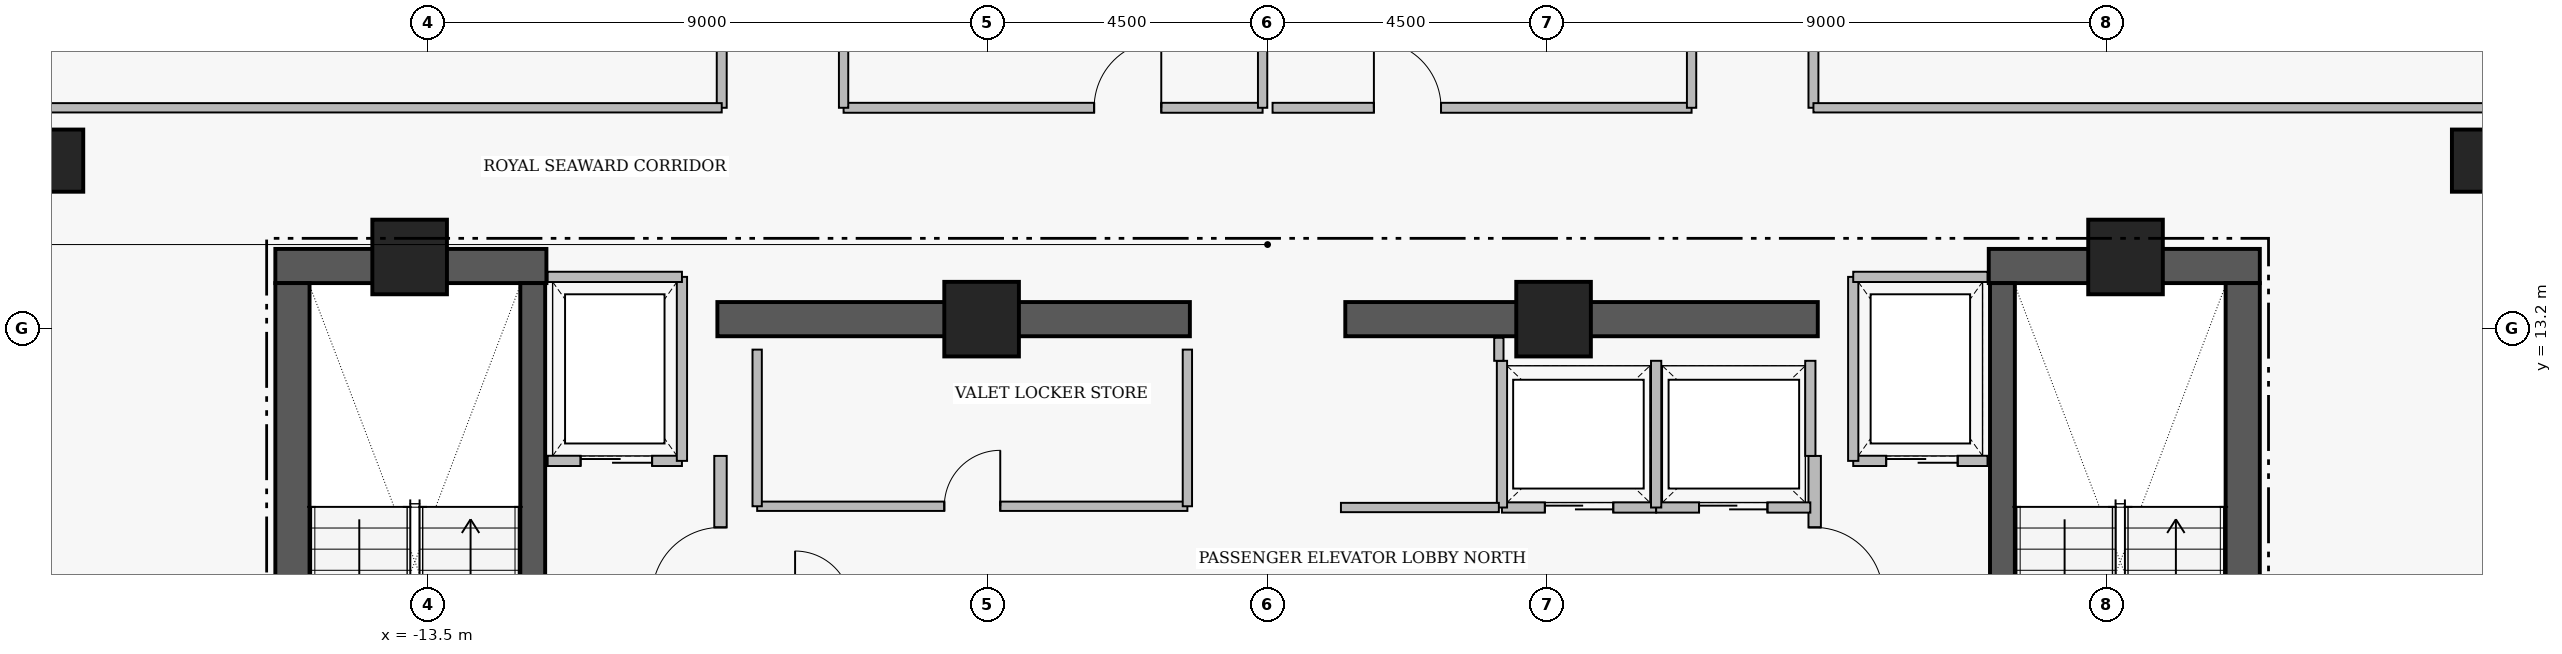
"""IFC4 building model, lengths in metres.
Left out: names, types, materials, properties, quantities, classifications, styles, units other than length and angle.
Written with IfcOpenShell. Run it as: python <this file> out.ifc"""

import sys

from ifc_helpers import new_model, si_unit, direction, frame, frame_2d, origin, origin_2d, place, context, subcontext, project, spatial, rectangle, extrude, element, fill, save


model = new_model("IFC4")
c1 = context("Model", 3, precision=1e-05, world=origin(), true_north=direction((0.0, 1.0)))
c2 = subcontext(c1, "Body", "Model", "MODEL_VIEW")
j1 = project(units=[si_unit("LENGTHUNIT", "METRE"), si_unit("PLANEANGLEUNIT", "RADIAN")], contexts=[c1])
p1 = place(None, origin())
s1 = spatial("IfcSite", under=j1, at=p1, CompositionType="ELEMENT")
p2 = place(p1, origin())
s2 = spatial("IfcBuilding", under=s1, at=p2, CompositionType="ELEMENT")
p3 = place(p2, frame((0.0, 0.0, 288.45)))
s3 = spatial("IfcBuildingStorey", under=s2, at=p3, CompositionType="ELEMENT", Elevation=288.45)
for number, where, z_axis, x_axis in (
    (1, (-15.96, 14.205, 0.0), (0.0, 0.0, 1.0), (1.0, 0.0, 0.0)),
    (2, (11.6, 14.205, 0.0), (0.0, 0.0, 1.0), (1.0, 0.0, 0.0)),
):
    element("IfcWall", number, at=place(p3, frame(where, z_axis=z_axis, x_axis=x_axis)), inside=s3, PredefinedType="SHEAR", context=c2, shape_type="SweptSolid", body=[
        extrude(rectangle(XDim=4.36, YDim=0.55, at=frame_2d((2.18, 0.0))), origin(), (0.0, 0.0, 1.0), 4.21),
    ])
for number, where, z_axis, x_axis in (
    (3, (-15.685, 4.97, 0.0), (0.0, 0.0, 1.0), (0.0, 1.0, 0.0)),
    (4, (15.685, 4.97, 0.0), (0.0, 0.0, 1.0), (0.0, 1.0, 0.0)),
):
    element("IfcWall", number, at=place(p3, frame(where, z_axis=z_axis, x_axis=x_axis)), inside=s3, PredefinedType="SHEAR", context=c2, shape_type="SweptSolid", body=[
        extrude(rectangle(XDim=8.96, YDim=0.55, at=frame_2d((4.48, 0.0))), origin(), (0.0, 0.0, 1.0), 4.21),
    ])
for number, where, z_axis, x_axis in (
    (5, (-8.85, 13.35, 0.0), (0.0, 0.0, 1.0), (1.0, 0.0, 0.0)),
    (6, (1.25, 13.35, 0.0), (0.0, 0.0, 1.0), (1.0, 0.0, 0.0)),
):
    element("IfcWall", number, at=place(p3, frame(where, z_axis=z_axis, x_axis=x_axis)), inside=s3, PredefinedType="SHEAR", context=c2, shape_type="SweptSolid", body=[
        extrude(rectangle(XDim=7.6, YDim=0.55, at=frame_2d((3.8, 0.0))), origin(), (0.0, 0.0, 1.0), 4.18),
    ])
p4 = place(p3, frame((-11.82, 4.97, 0.0), z_axis=(0.0, 0.0, 1.0), x_axis=(0.0, 1.0, 0.0)))
e7 = element("IfcWall", 7, at=p4, inside=s3, PredefinedType="SHEAR", context=c2, shape_type="SweptSolid", body=[
    extrude(rectangle(XDim=8.96, YDim=0.4, at=frame_2d((4.48, 0.0))), origin(), (0.0, 0.0, 1.0), 4.21),
])
p5 = place(p4, frame((0.31, 0.0, 0.0)))
e8 = element("IfcOpeningElement", 8, at=p5, cuts=e7, PredefinedType="OPENING", context=c2, shape_type="SweptSolid", body=[
    extrude(rectangle(XDim=1.12, YDim=2.22, at=frame_2d((0.56, 1.11))), frame((0.0, 0.21, 0.0), z_axis=(0.0, -1.0, 0.0), x_axis=(1.0, 0.0, 0.0)), (0.0, 0.0, 1.0), 0.42),
])
p6 = place(p3, frame((11.82, 13.93, 0.0), z_axis=(0.0, 0.0, 1.0), x_axis=(0.0, -1.0, 0.0)))
e9 = element("IfcWall", 9, at=p6, inside=s3, PredefinedType="SHEAR", context=c2, shape_type="SweptSolid", body=[
    extrude(rectangle(XDim=8.96, YDim=0.4, at=frame_2d((4.48, 0.0))), origin(), (0.0, 0.0, 1.0), 4.21),
])
p7 = place(p6, frame((7.53, 0.0, 0.0)))
e10 = element("IfcOpeningElement", 10, at=p7, cuts=e9, PredefinedType="OPENING", context=c2, shape_type="SweptSolid", body=[
    extrude(rectangle(XDim=1.12, YDim=2.22, at=frame_2d((0.56, 1.11))), frame((0.0, 0.21, 0.0), z_axis=(0.0, -1.0, 0.0), x_axis=(1.0, 0.0, 0.0)), (0.0, 0.0, 1.0), 0.42),
])
for number, where, z_axis, x_axis in (
    (11, (-13.8, 14.35, 0.0), (0.0, 0.0, 1.0), (1.0, 0.0, 0.0)),
    (12, (-4.6, 13.35, 0.0), (0.0, 0.0, 1.0), (1.0, 0.0, 0.0)),
    (13, (4.6, 13.35, 0.0), (0.0, 0.0, 1.0), (1.0, 0.0, 0.0)),
    (14, (13.8, 14.35, 0.0), (0.0, 0.0, 1.0), (1.0, 0.0, 0.0)),
):
    element("IfcColumn", number, at=place(p3, frame(where, z_axis=z_axis, x_axis=x_axis)), inside=s3, PredefinedType="COLUMN", context=c2, shape_type="SweptSolid", body=[
        extrude(rectangle(XDim=1.2, YDim=1.2, at=origin_2d()), origin(), (0.0, 0.0, 1.0), 4.4),
    ])
for number, where, z_axis, x_axis in (
    (15, (-19.55, 15.9, 0.0), (0.0, 0.0, 1.0), (1.0, 0.0, 0.0)),
    (16, (19.55, 15.9, 0.0), (0.0, 0.0, 1.0), (1.0, 0.0, 0.0)),
):
    element("IfcColumn", number, at=place(p3, frame(where, z_axis=z_axis, x_axis=x_axis)), inside=s3, PredefinedType="COLUMN", context=c2, shape_type="SweptSolid", body=[
        extrude(rectangle(XDim=1.0, YDim=1.0, at=origin_2d()), origin(), (0.0, 0.0, 1.0), 4.4),
    ])
p8 = place(p3, frame((-8.8, 5.05, 0.0), z_axis=(0.0, 0.0, 1.0), x_axis=(0.0, 1.0, 0.0)))
e17 = element("IfcWall", 17, at=p8, inside=s3, PredefinedType="PARTITIONING", context=c2, shape_type="SweptSolid", body=[
    extrude(rectangle(XDim=6.1, YDim=0.2, at=frame_2d((3.05, 0.0))), origin(), (0.0, 0.0, 1.0), 4.18),
])
p9 = place(p8, frame((0.25, 0.0, 0.0)))
e18 = element("IfcOpeningElement", 18, at=p9, cuts=e17, PredefinedType="OPENING", context=c2, shape_type="SweptSolid", body=[
    extrude(rectangle(XDim=1.1, YDim=2.2, at=frame_2d((0.55, 1.1))), frame((0.0, 0.11, 0.0), z_axis=(0.0, -1.0, 0.0), x_axis=(1.0, 0.0, 0.0)), (0.0, 0.0, 1.0), 0.22),
])
p10 = place(p8, frame((3.85, 0.0, 0.0)))
e19 = element("IfcOpeningElement", 19, at=p10, cuts=e17, PredefinedType="OPENING", context=c2, shape_type="SweptSolid", body=[
    extrude(rectangle(XDim=1.1, YDim=2.2, at=frame_2d((0.55, 1.1))), frame((0.0, 0.11, 0.0), z_axis=(0.0, -1.0, 0.0), x_axis=(1.0, 0.0, 0.0)), (0.0, 0.0, 1.0), 0.22),
])
p11 = place(p3, frame((8.8, 11.15, 0.0), z_axis=(0.0, 0.0, 1.0), x_axis=(0.0, -1.0, 0.0)))
e20 = element("IfcWall", 20, at=p11, inside=s3, PredefinedType="PARTITIONING", context=c2, shape_type="SweptSolid", body=[
    extrude(rectangle(XDim=6.1, YDim=0.2, at=frame_2d((3.05, 0.0))), origin(), (0.0, 0.0, 1.0), 4.18),
])
p12 = place(p11, frame((1.15, 0.0, 0.0)))
e21 = element("IfcOpeningElement", 21, at=p12, cuts=e20, PredefinedType="OPENING", context=c2, shape_type="SweptSolid", body=[
    extrude(rectangle(XDim=1.1, YDim=2.2, at=frame_2d((0.55, 1.1))), frame((0.0, 0.11, 0.0), z_axis=(0.0, -1.0, 0.0), x_axis=(1.0, 0.0, 0.0)), (0.0, 0.0, 1.0), 0.22),
])
p13 = place(p11, frame((4.75, 0.0, 0.0)))
e22 = element("IfcOpeningElement", 22, at=p13, cuts=e20, PredefinedType="OPENING", context=c2, shape_type="SweptSolid", body=[
    extrude(rectangle(XDim=1.1, YDim=2.2, at=frame_2d((0.55, 1.1))), frame((0.0, 0.11, 0.0), z_axis=(0.0, -1.0, 0.0), x_axis=(1.0, 0.0, 0.0)), (0.0, 0.0, 1.0), 0.22),
])
p14 = place(p3, frame((-11.58, 11.07, 0.0), z_axis=(0.0, 0.0, 1.0), x_axis=(1.0, 0.0, 0.0)))
e23 = element("IfcWall", 23, at=p14, inside=s3, PredefinedType="PARTITIONING", context=c2, shape_type="SweptSolid", body=[
    extrude(rectangle(XDim=2.16, YDim=0.165, at=frame_2d((1.08, 0.0))), origin(), (0.0, 0.0, 1.0), 4.18),
])
p15 = place(p14, frame((0.53, 0.0, 0.0)))
e24 = element("IfcOpeningElement", 24, at=p15, cuts=e23, PredefinedType="OPENING", context=c2, shape_type="SweptSolid", body=[
    extrude(rectangle(XDim=1.15, YDim=2.25, at=frame_2d((0.575, 1.125))), frame((0.0, 0.093, 0.0), z_axis=(0.0, -1.0, 0.0), x_axis=(1.0, 0.0, 0.0)), (0.0, 0.0, 1.0), 0.185),
])
p16 = place(p3, frame((9.42, 11.07, 0.0), z_axis=(0.0, 0.0, 1.0), x_axis=(1.0, 0.0, 0.0)))
e25 = element("IfcWall", 25, at=p16, inside=s3, PredefinedType="PARTITIONING", context=c2, shape_type="SweptSolid", body=[
    extrude(rectangle(XDim=2.16, YDim=0.165, at=frame_2d((1.08, 0.0))), origin(), (0.0, 0.0, 1.0), 4.18),
])
p17 = place(p16, frame((0.53, 0.0, 0.0)))
e26 = element("IfcOpeningElement", 26, at=p17, cuts=e25, PredefinedType="OPENING", context=c2, shape_type="SweptSolid", body=[
    extrude(rectangle(XDim=1.15, YDim=2.25, at=frame_2d((0.575, 1.125))), frame((0.0, 0.093, 0.0), z_axis=(0.0, -1.0, 0.0), x_axis=(1.0, 0.0, 0.0)), (0.0, 0.0, 1.0), 0.185),
])
p18 = place(p3, frame((3.77, 10.32, 0.0), z_axis=(0.0, 0.0, 1.0), x_axis=(1.0, 0.0, 0.0)))
e27 = element("IfcWall", 27, at=p18, inside=s3, PredefinedType="PARTITIONING", context=c2, shape_type="SweptSolid", body=[
    extrude(rectangle(XDim=2.48, YDim=0.165, at=frame_2d((1.24, 0.0))), origin(), (0.0, 0.0, 1.0), 4.18),
])
p19 = place(p18, frame((0.69, 0.0, 0.0)))
e28 = element("IfcOpeningElement", 28, at=p19, cuts=e27, PredefinedType="OPENING", context=c2, shape_type="SweptSolid", body=[
    extrude(rectangle(XDim=1.1, YDim=2.25, at=frame_2d((0.55, 1.125))), frame((0.0, 0.093, 0.0), z_axis=(0.0, -1.0, 0.0), x_axis=(1.0, 0.0, 0.0)), (0.0, 0.0, 1.0), 0.185),
])
p20 = place(p3, frame((6.25, 10.32, 0.0), z_axis=(0.0, 0.0, 1.0), x_axis=(1.0, 0.0, 0.0)))
e29 = element("IfcWall", 29, at=p20, inside=s3, PredefinedType="PARTITIONING", context=c2, shape_type="SweptSolid", body=[
    extrude(rectangle(XDim=2.48, YDim=0.165, at=frame_2d((1.24, 0.0))), origin(), (0.0, 0.0, 1.0), 4.18),
])
p21 = place(p20, frame((0.69, 0.0, 0.0)))
e30 = element("IfcOpeningElement", 30, at=p21, cuts=e29, PredefinedType="OPENING", context=c2, shape_type="SweptSolid", body=[
    extrude(rectangle(XDim=1.1, YDim=2.25, at=frame_2d((0.55, 1.125))), frame((0.0, 0.093, 0.0), z_axis=(0.0, -1.0, 0.0), x_axis=(1.0, 0.0, 0.0)), (0.0, 0.0, 1.0), 0.185),
])
p22 = place(p3, frame((-8.21, 10.34, 0.0), z_axis=(0.0, 0.0, 1.0), x_axis=(1.0, 0.0, 0.0)))
e31 = element("IfcWall", 31, at=p22, inside=s3, PredefinedType="PARTITIONING", context=c2, shape_type="SweptSolid", body=[
    extrude(rectangle(XDim=6.92, YDim=0.15, at=frame_2d((3.46, 0.0))), origin(), (0.0, 0.0, 1.0), 4.18),
])
p23 = place(p22, frame((3.01, 0.0, 0.0)))
e32 = element("IfcOpeningElement", 32, at=p23, cuts=e31, PredefinedType="OPENING", context=c2, shape_type="SweptSolid", body=[
    extrude(rectangle(XDim=0.9, YDim=2.15, at=frame_2d((0.45, 1.075))), frame((0.0, 0.085, 0.0), z_axis=(0.0, -1.0, 0.0), x_axis=(1.0, 0.0, 0.0)), (0.0, 0.0, 1.0), 0.17),
])
p24 = place(p3, frame((-6.82, 16.75, 0.0), z_axis=(0.0, 0.0, 1.0), x_axis=(1.0, 0.0, 0.0)))
e33 = element("IfcWall", 33, at=p24, inside=s3, PredefinedType="PARTITIONING", context=c2, shape_type="SweptSolid", body=[
    extrude(rectangle(XDim=6.74, YDim=0.16, at=frame_2d((3.37, 0.0))), origin(), (0.0, 0.0, 1.0), 3.776),
])
p25 = place(p24, frame((4.03, 0.0, 0.0)))
e34 = element("IfcOpeningElement", 34, at=p25, cuts=e33, PredefinedType="OPENING", context=c2, shape_type="SweptSolid", body=[
    extrude(rectangle(XDim=1.08, YDim=2.18, at=frame_2d((0.54, 1.09))), frame((0.0, 0.09, 0.0), z_axis=(0.0, -1.0, 0.0), x_axis=(1.0, 0.0, 0.0)), (0.0, 0.0, 1.0), 0.18),
])
p26 = place(p3, frame((0.08, 16.75, 0.0), z_axis=(0.0, 0.0, 1.0), x_axis=(1.0, 0.0, 0.0)))
e35 = element("IfcWall", 35, at=p26, inside=s3, PredefinedType="PARTITIONING", context=c2, shape_type="SweptSolid", body=[
    extrude(rectangle(XDim=6.74, YDim=0.16, at=frame_2d((3.37, 0.0))), origin(), (0.0, 0.0, 1.0), 3.776),
])
p27 = place(p26, frame((1.63, 0.0, 0.0)))
e36 = element("IfcOpeningElement", 36, at=p27, cuts=e35, PredefinedType="OPENING", context=c2, shape_type="SweptSolid", body=[
    extrude(rectangle(XDim=1.08, YDim=2.18, at=frame_2d((0.54, 1.09))), frame((0.0, 0.09, 0.0), z_axis=(0.0, -1.0, 0.0), x_axis=(1.0, 0.0, 0.0)), (0.0, 0.0, 1.0), 0.18),
])
p28 = place(p3, frame((-8.78, 16.75, 0.0), z_axis=(0.0, 0.0, 1.0), x_axis=(0.0, 1.0, 0.0)))
e37 = element("IfcWall", 37, at=p28, inside=s3, PredefinedType="PARTITIONING", context=c2, shape_type="SweptSolid", body=[
    extrude(rectangle(XDim=14.2, YDim=0.16, at=frame_2d((7.1, 0.0))), origin(), (0.0, 0.0, 1.0), 4.18),
])
p29 = place(p28, frame((6.56, 0.0, 0.0)))
e38 = element("IfcOpeningElement", 38, at=p29, cuts=e37, PredefinedType="OPENING", context=c2, shape_type="SweptSolid", body=[
    extrude(rectangle(XDim=1.08, YDim=2.18, at=frame_2d((0.54, 1.09))), frame((0.0, 0.09, 0.0), z_axis=(0.0, -1.0, 0.0), x_axis=(1.0, 0.0, 0.0)), (0.0, 0.0, 1.0), 0.18),
])
p30 = place(p3, frame((8.78, 16.75, 0.0), z_axis=(0.0, 0.0, 1.0), x_axis=(0.0, 1.0, 0.0)))
e39 = element("IfcWall", 39, at=p30, inside=s3, PredefinedType="PARTITIONING", context=c2, shape_type="SweptSolid", body=[
    extrude(rectangle(XDim=14.2, YDim=0.16, at=frame_2d((7.1, 0.0))), origin(), (0.0, 0.0, 1.0), 4.18),
])
p31 = place(p30, frame((6.56, 0.0, 0.0)))
e40 = element("IfcOpeningElement", 40, at=p31, cuts=e39, PredefinedType="OPENING", context=c2, shape_type="SweptSolid", body=[
    extrude(rectangle(XDim=1.08, YDim=2.18, at=frame_2d((0.54, 1.09))), frame((0.0, 0.09, 0.0), z_axis=(0.0, -1.0, 0.0), x_axis=(1.0, 0.0, 0.0)), (0.0, 0.0, 1.0), 0.18),
])
p32 = place(p3, frame((-9.42, 11.07, 0.0), z_axis=(0.0, 0.0, 1.0), x_axis=(0.0, 1.0, 0.0)))
e41 = element("IfcWall", 41, at=p32, inside=s3, PredefinedType="PARTITIONING", context=c2, shape_type="SweptSolid", body=[
    extrude(rectangle(XDim=2.96, YDim=0.165, at=frame_2d((1.48, 0.0))), origin(), (0.0, 0.0, 1.0), 4.18),
])
p33 = place(p3, frame((-11.58, 14.03, 0.0), z_axis=(0.0, 0.0, 1.0), x_axis=(1.0, 0.0, 0.0)))
e42 = element("IfcWall", 42, at=p33, inside=s3, PredefinedType="PARTITIONING", context=c2, shape_type="SweptSolid", body=[
    extrude(rectangle(XDim=2.16, YDim=0.165, at=frame_2d((1.08, 0.0))), origin(), (0.0, 0.0, 1.0), 4.18),
])
p34 = place(p3, frame((9.42, 11.07, 0.0), z_axis=(0.0, 0.0, 1.0), x_axis=(0.0, 1.0, 0.0)))
e43 = element("IfcWall", 43, at=p34, inside=s3, PredefinedType="PARTITIONING", context=c2, shape_type="SweptSolid", body=[
    extrude(rectangle(XDim=2.96, YDim=0.165, at=frame_2d((1.48, 0.0))), origin(), (0.0, 0.0, 1.0), 4.18),
])
p35 = place(p3, frame((9.42, 14.03, 0.0), z_axis=(0.0, 0.0, 1.0), x_axis=(1.0, 0.0, 0.0)))
e44 = element("IfcWall", 44, at=p35, inside=s3, PredefinedType="PARTITIONING", context=c2, shape_type="SweptSolid", body=[
    extrude(rectangle(XDim=2.16, YDim=0.165, at=frame_2d((1.08, 0.0))), origin(), (0.0, 0.0, 1.0), 4.18),
])
for number, where, z_axis, x_axis in (
    (45, (3.77, 10.32, 0.0), (0.0, 0.0, 1.0), (0.0, 1.0, 0.0)),
    (46, (6.25, 10.32, 0.0), (0.0, 0.0, 1.0), (0.0, 1.0, 0.0)),
):
    element("IfcWall", number, at=place(p3, frame(where, z_axis=z_axis, x_axis=x_axis)), inside=s3, PredefinedType="PARTITIONING", context=c2, shape_type="SweptSolid", body=[
        extrude(rectangle(XDim=2.36, YDim=0.165, at=frame_2d((1.18, 0.0))), origin(), (0.0, 0.0, 1.0), 4.18),
    ])
p36 = place(p3, frame((8.73, 11.15, 0.0), z_axis=(0.0, 0.0, 1.0), x_axis=(0.0, 1.0, 0.0)))
e47 = element("IfcWall", 47, at=p36, inside=s3, PredefinedType="PARTITIONING", context=c2, shape_type="SweptSolid", body=[
    extrude(rectangle(XDim=1.53, YDim=0.165, at=frame_2d((0.765, 0.0))), origin(), (0.0, 0.0, 1.0), 4.18),
])
for number, where, z_axis, x_axis in (
    (48, (-8.21, 10.34, 0.0), (0.0, 0.0, 1.0), (0.0, 1.0, 0.0)),
    (49, (-1.29, 10.34, 0.0), (0.0, 0.0, 1.0), (0.0, 1.0, 0.0)),
):
    element("IfcWall", number, at=place(p3, frame(where, z_axis=z_axis, x_axis=x_axis)), inside=s3, PredefinedType="PARTITIONING", context=c2, shape_type="SweptSolid", body=[
        extrude(rectangle(XDim=2.52, YDim=0.15, at=frame_2d((1.26, 0.0))), origin(), (0.0, 0.0, 1.0), 4.18),
    ])
p37 = place(p3, frame((1.18, 10.32, 0.0), z_axis=(0.0, 0.0, 1.0), x_axis=(1.0, 0.0, 0.0)))
e50 = element("IfcWall", 50, at=p37, inside=s3, PredefinedType="PARTITIONING", context=c2, shape_type="SweptSolid", body=[
    extrude(rectangle(XDim=2.54, YDim=0.15, at=frame_2d((1.27, 0.0))), origin(), (0.0, 0.0, 1.0), 4.18),
])
p38 = place(p3, frame((3.72, 12.68, 0.0), z_axis=(0.0, 0.0, 1.0), x_axis=(0.0, 1.0, 0.0)))
e51 = element("IfcWall", 51, at=p38, inside=s3, PredefinedType="PARTITIONING", context=c2, shape_type="SweptSolid", body=[
    extrude(rectangle(XDim=0.37, YDim=0.15, at=frame_2d((0.185, 0.0))), origin(), (0.0, 0.0, 1.0), 4.18),
])
for number, where, z_axis, x_axis in (
    (52, (-6.82, 16.75, 0.0), (0.0, 0.0, 1.0), (0.0, 1.0, 0.0)),
    (53, (-0.08, 16.75, 0.0), (0.0, 0.0, 1.0), (0.0, 1.0, 0.0)),
    (54, (6.82, 16.75, 0.0), (0.0, 0.0, 1.0), (0.0, 1.0, 0.0)),
):
    element("IfcWall", number, at=place(p3, frame(where, z_axis=z_axis, x_axis=x_axis)), inside=s3, PredefinedType="PARTITIONING", context=c2, shape_type="SweptSolid", body=[
        extrude(rectangle(XDim=7.45, YDim=0.15, at=frame_2d((3.725, 0.0))), origin(), (0.0, 0.0, 1.0), 4.18),
    ])
for number, where, z_axis, x_axis in (
    (55, (-21.146, 16.75, 0.0), (0.0, 0.0, 1.0), (1.0, 0.0, 0.0)),
    (56, (8.78, 16.75, 0.0), (0.0, 0.0, 1.0), (1.0, 0.0, 0.0)),
):
    element("IfcWall", number, at=place(p3, frame(where, z_axis=z_axis, x_axis=x_axis)), inside=s3, PredefinedType="PARTITIONING", context=c2, shape_type="SweptSolid", body=[
        extrude(rectangle(XDim=12.365, YDim=0.15, at=frame_2d((6.183, 0.0))), origin(), (0.0, 0.0, 1.0), 3.776),
    ])
p39 = place(p10, origin())
e57 = element("IfcDoor", 57, at=p39, inside=s3, OperationType="SINGLE_SWING_LEFT", PredefinedType="DOOR", context=c2, shape_type="SweptSolid", body=[
    extrude(rectangle(XDim=1.1, YDim=2.2, at=frame_2d((0.55, 1.1))), frame((0.0, 0.025, 0.0), z_axis=(0.0, -1.0, 0.0), x_axis=(1.0, 0.0, 0.0)), (0.0, 0.0, 1.0), 0.05),
])
fill(e19, e57)
p40 = place(p12, origin())
e58 = element("IfcDoor", 58, at=p40, inside=s3, OperationType="SINGLE_SWING_RIGHT", PredefinedType="DOOR", context=c2, shape_type="SweptSolid", body=[
    extrude(rectangle(XDim=1.1, YDim=2.2, at=frame_2d((0.55, 1.1))), frame((0.0, 0.025, 0.0), z_axis=(0.0, -1.0, 0.0), x_axis=(1.0, 0.0, 0.0)), (0.0, 0.0, 1.0), 0.05),
])
fill(e21, e58)
p41 = place(p15, origin())
e59 = element("IfcDoor", 59, at=p41, inside=s3, OperationType="SLIDING_TO_LEFT", PredefinedType="DOOR", context=c2, shape_type="SweptSolid", body=[
    extrude(rectangle(XDim=1.15, YDim=2.25, at=frame_2d((0.575, 1.125))), frame((0.0, 0.025, 0.0), z_axis=(0.0, -1.0, 0.0), x_axis=(1.0, 0.0, 0.0)), (0.0, 0.0, 1.0), 0.05),
])
fill(e24, e59)
p42 = place(p17, origin())
e60 = element("IfcDoor", 60, at=p42, inside=s3, OperationType="SLIDING_TO_LEFT", PredefinedType="DOOR", context=c2, shape_type="SweptSolid", body=[
    extrude(rectangle(XDim=1.15, YDim=2.25, at=frame_2d((0.575, 1.125))), frame((0.0, 0.025, 0.0), z_axis=(0.0, -1.0, 0.0), x_axis=(1.0, 0.0, 0.0)), (0.0, 0.0, 1.0), 0.05),
])
fill(e26, e60)
p43 = place(p19, origin())
e61 = element("IfcDoor", 61, at=p43, inside=s3, OperationType="SLIDING_TO_LEFT", PredefinedType="DOOR", context=c2, shape_type="SweptSolid", body=[
    extrude(rectangle(XDim=1.1, YDim=2.25, at=frame_2d((0.55, 1.125))), frame((0.0, 0.025, 0.0), z_axis=(0.0, -1.0, 0.0), x_axis=(1.0, 0.0, 0.0)), (0.0, 0.0, 1.0), 0.05),
])
fill(e28, e61)
p44 = place(p21, origin())
e62 = element("IfcDoor", 62, at=p44, inside=s3, OperationType="SLIDING_TO_LEFT", PredefinedType="DOOR", context=c2, shape_type="SweptSolid", body=[
    extrude(rectangle(XDim=1.1, YDim=2.25, at=frame_2d((0.55, 1.125))), frame((0.0, 0.025, 0.0), z_axis=(0.0, -1.0, 0.0), x_axis=(1.0, 0.0, 0.0)), (0.0, 0.0, 1.0), 0.05),
])
fill(e30, e62)
p45 = place(p23, origin())
e63 = element("IfcDoor", 63, at=p45, inside=s3, OperationType="SINGLE_SWING_RIGHT", PredefinedType="DOOR", context=c2, shape_type="SweptSolid", body=[
    extrude(rectangle(XDim=0.9, YDim=2.15, at=frame_2d((0.45, 1.075))), frame((0.0, 0.025, 0.0), z_axis=(0.0, -1.0, 0.0), x_axis=(1.0, 0.0, 0.0)), (0.0, 0.0, 1.0), 0.05),
])
fill(e32, e63)
p46 = place(p25, origin())
e64 = element("IfcDoor", 64, at=p46, inside=s3, OperationType="SINGLE_SWING_RIGHT", PredefinedType="DOOR", context=c2, shape_type="SweptSolid", body=[
    extrude(rectangle(XDim=1.08, YDim=2.18, at=frame_2d((0.54, 1.09))), frame((0.0, 0.025, 0.0), z_axis=(0.0, -1.0, 0.0), x_axis=(1.0, 0.0, 0.0)), (0.0, 0.0, 1.0), 0.05),
])
fill(e34, e64)
p47 = place(p27, origin())
e65 = element("IfcDoor", 65, at=p47, inside=s3, OperationType="SINGLE_SWING_LEFT", PredefinedType="DOOR", context=c2, shape_type="SweptSolid", body=[
    extrude(rectangle(XDim=1.08, YDim=2.18, at=frame_2d((0.54, 1.09))), frame((0.0, 0.025, 0.0), z_axis=(0.0, -1.0, 0.0), x_axis=(1.0, 0.0, 0.0)), (0.0, 0.0, 1.0), 0.05),
])
fill(e36, e65)
save(model, sys.argv[1])
